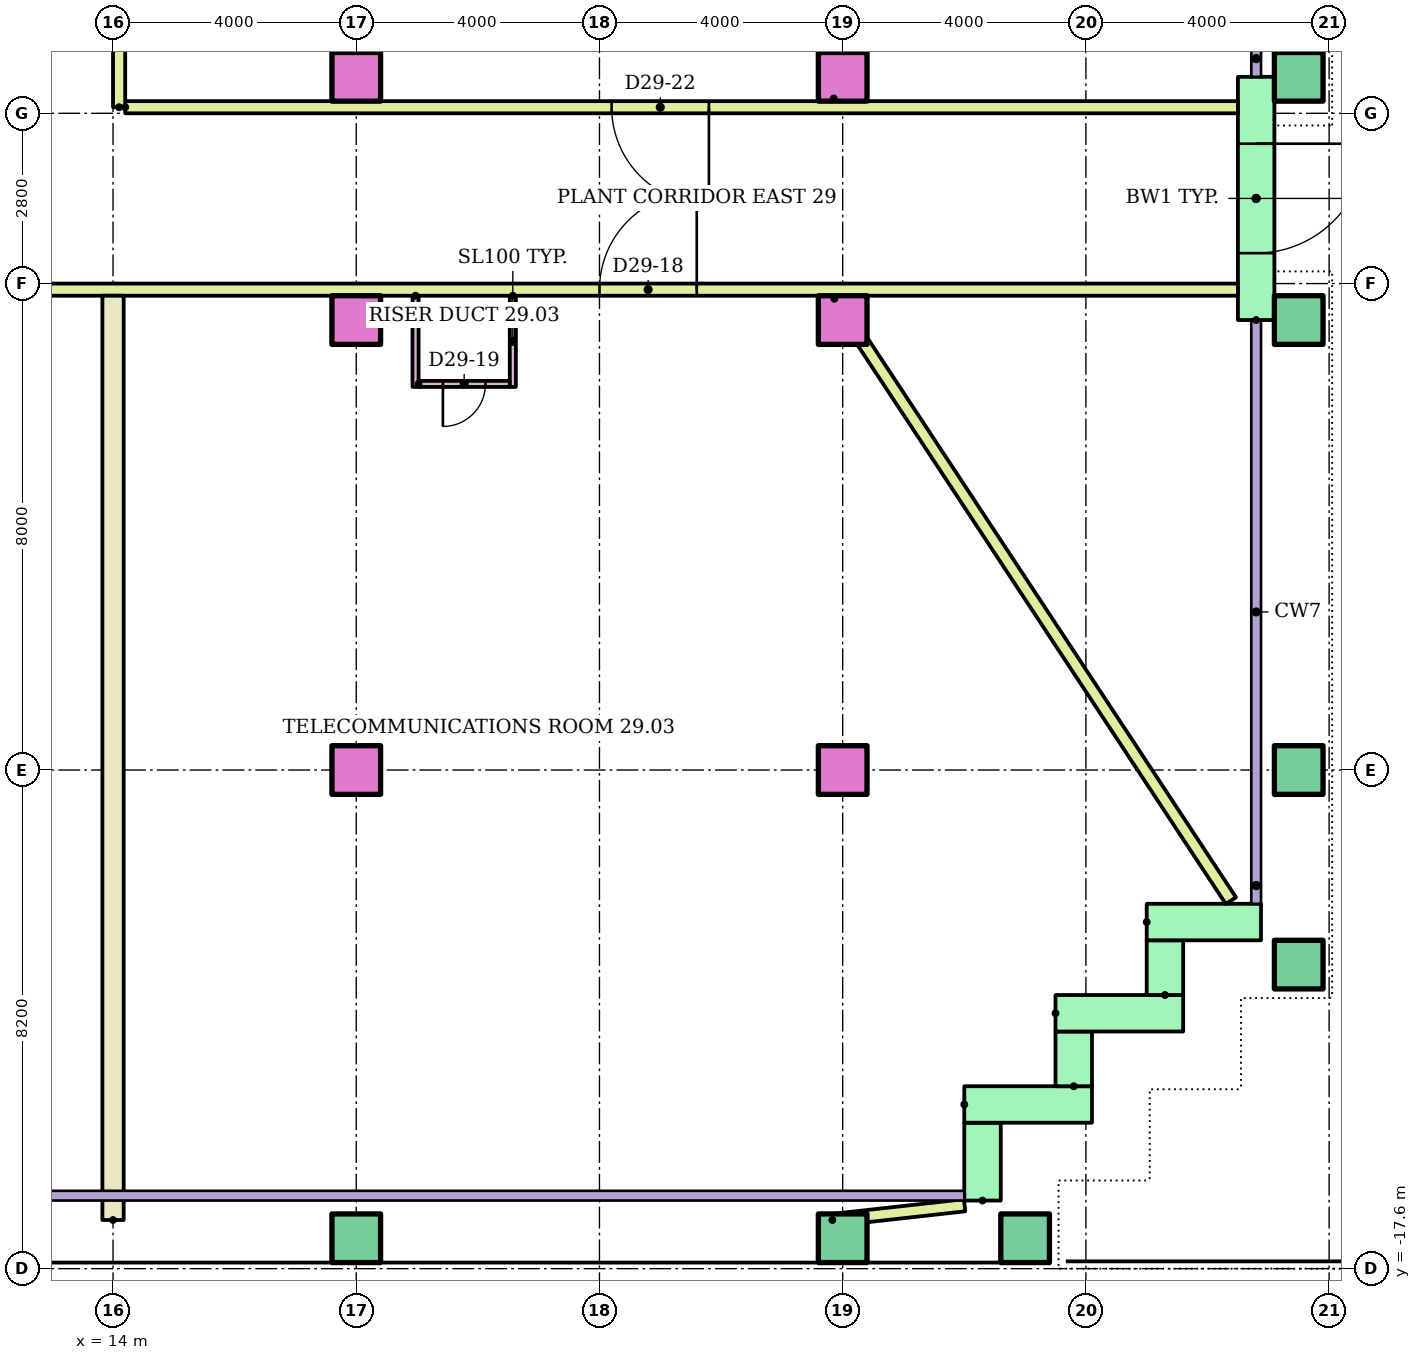
"""IFC4 building model, lengths in metres.
Left out: names, types, materials, properties, quantities, classifications, styles, units other than length and angle.
Written with IfcOpenShell. Run it as: python <this file> out.ifc"""

import sys

from ifc_helpers import new_model, si_unit, direction, frame, frame_2d, origin, origin_2d, place, context, subcontext, project, spatial, rectangle, hollow_rectangle, extrude, element, fill, save


model = new_model("IFC4")
c1 = context("Model", 3, precision=1e-05, world=origin(), true_north=direction((0.0, 1.0)))
c2 = subcontext(c1, "Body", "Model", "MODEL_VIEW")
j1 = project(units=[si_unit("LENGTHUNIT", "METRE"), si_unit("PLANEANGLEUNIT", "RADIAN")], contexts=[c1])
p1 = place(None, origin())
s1 = spatial("IfcSite", under=j1, at=p1, CompositionType="ELEMENT")
p2 = place(p1, origin())
s2 = spatial("IfcBuilding", under=s1, at=p2, CompositionType="ELEMENT")
p3 = place(p2, frame((0.0, 0.0, 115.9)))
s3 = spatial("IfcBuildingStorey", under=s2, at=p3, CompositionType="ELEMENT", Elevation=115.9)
for number, where in (
    (1, (18.0, -17.1, 0.0)),
    (2, (26.0, -17.1, 0.0)),
    (3, (29.0, -17.1, 0.0)),
    (4, (33.5, -12.6, 0.0)),
):
    element("IfcColumn", number, at=place(p3, frame(where)), inside=s3, PredefinedType="COLUMN", context=c2, shape_type="SweptSolid", body=[
        extrude(hollow_rectangle(XDim=0.8, YDim=0.8, WallThickness=0.04, at=origin_2d()), origin(), (0.0, 0.0, 1.0), 3.9),
    ])
for number, where in (
    (5, (18.0, -9.4, 0.0)),
    (6, (26.0, -9.4, 0.0)),
):
    element("IfcColumn", number, at=place(p3, frame(where)), inside=s3, PredefinedType="COLUMN", context=c2, shape_type="SweptSolid", body=[
        extrude(rectangle(XDim=0.8, YDim=0.8, at=origin_2d()), origin(), (0.0, 0.0, 1.0), 3.9),
    ])
p4 = place(p3, frame((33.5, -9.4, 0.0)))
e7 = element("IfcColumn", 7, at=p4, inside=s3, PredefinedType="COLUMN", context=c2, shape_type="SweptSolid", body=[
    extrude(hollow_rectangle(XDim=0.8, YDim=0.8, WallThickness=0.04, at=origin_2d()), origin(), (0.0, 0.0, 1.0), 3.9),
])
for number, where in (
    (8, (18.0, -2.0, 0.0)),
    (9, (26.0, -2.0, 0.0)),
):
    element("IfcColumn", number, at=place(p3, frame(where)), inside=s3, PredefinedType="COLUMN", context=c2, shape_type="SweptSolid", body=[
        extrude(rectangle(XDim=0.8, YDim=0.8, at=origin_2d()), origin(), (0.0, 0.0, 1.0), 3.9),
    ])
p5 = place(p3, frame((33.5, -2.0, 0.0)))
e10 = element("IfcColumn", 10, at=p5, inside=s3, PredefinedType="COLUMN", context=c2, shape_type="SweptSolid", body=[
    extrude(hollow_rectangle(XDim=0.8, YDim=0.8, WallThickness=0.04, at=origin_2d()), origin(), (0.0, 0.0, 1.0), 3.9),
])
for number, where in (
    (11, (18.0, 2.0, 0.0)),
    (12, (26.0, 2.0, 0.0)),
):
    element("IfcColumn", number, at=place(p3, frame(where)), inside=s3, PredefinedType="COLUMN", context=c2, shape_type="SweptSolid", body=[
        extrude(rectangle(XDim=0.8, YDim=0.8, at=origin_2d()), origin(), (0.0, 0.0, 1.0), 3.9),
    ])
p6 = place(p3, frame((33.5, 2.0, 0.0)))
e13 = element("IfcColumn", 13, at=p6, inside=s3, PredefinedType="COLUMN", context=c2, shape_type="SweptSolid", body=[
    extrude(hollow_rectangle(XDim=0.8, YDim=0.8, WallThickness=0.04, at=origin_2d()), origin(), (0.0, 0.0, 1.0), 3.9),
])
p7 = place(p3, frame((28.3, -16.48, 0.0), z_axis=(0.0, 0.0, 1.0), x_axis=(0.0, 1.0, 0.0)))
e14 = element("IfcWall", 14, at=p7, inside=s3, PredefinedType="STANDARD", context=c2, shape_type="SweptSolid", body=[
    extrude(rectangle(XDim=1.28, YDim=0.6, at=frame_2d((0.64, 0.0))), origin(), (0.0, 0.0, 1.0), 3.62),
])
p8 = place(p3, frame((28.0, -14.9, 0.0)))
e15 = element("IfcWall", 15, at=p8, inside=s3, PredefinedType="STANDARD", context=c2, shape_type="SweptSolid", body=[
    extrude(rectangle(XDim=2.1, YDim=0.6, at=frame_2d((1.05, 0.0))), origin(), (0.0, 0.0, 1.0), 3.62),
])
p9 = place(p3, frame((29.8, -14.6, 0.0), z_axis=(0.0, 0.0, 1.0), x_axis=(0.0, 1.0, 0.0)))
e16 = element("IfcWall", 16, at=p9, inside=s3, PredefinedType="STANDARD", context=c2, shape_type="SweptSolid", body=[
    extrude(rectangle(XDim=0.9, YDim=0.6, at=frame_2d((0.45, 0.0))), origin(), (0.0, 0.0, 1.0), 3.62),
])
p10 = place(p3, frame((29.5, -13.4, 0.0)))
e17 = element("IfcWall", 17, at=p10, inside=s3, PredefinedType="STANDARD", context=c2, shape_type="SweptSolid", body=[
    extrude(rectangle(XDim=2.1, YDim=0.6, at=frame_2d((1.05, 0.0))), origin(), (0.0, 0.0, 1.0), 3.62),
])
p11 = place(p3, frame((31.3, -13.1, 0.0), z_axis=(0.0, 0.0, 1.0), x_axis=(0.0, 1.0, 0.0)))
e18 = element("IfcWall", 18, at=p11, inside=s3, PredefinedType="STANDARD", context=c2, shape_type="SweptSolid", body=[
    extrude(rectangle(XDim=0.9, YDim=0.6, at=frame_2d((0.45, 0.0))), origin(), (0.0, 0.0, 1.0), 3.62),
])
p12 = place(p3, frame((31.0, -11.9, 0.0)))
e19 = element("IfcWall", 19, at=p12, inside=s3, PredefinedType="STANDARD", context=c2, shape_type="SweptSolid", body=[
    extrude(rectangle(XDim=1.88, YDim=0.6, at=frame_2d((0.94, 0.0))), origin(), (0.0, 0.0, 1.0), 3.62),
])
p13 = place(p3, frame((32.8, -2.0, 0.0), z_axis=(0.0, 0.0, 1.0), x_axis=(0.0, 1.0, 0.0)))
e20 = element("IfcWall", 20, at=p13, inside=s3, PredefinedType="STANDARD", context=c2, shape_type="SweptSolid", body=[
    extrude(rectangle(XDim=4.0, YDim=0.6, at=frame_2d((2.0, 0.0))), origin(), (0.0, 0.0, 1.0), 3.62),
])
p14 = place(p13, frame((1.1, 0.0, 0.0)))
e21 = element("IfcOpeningElement", 21, at=p14, cuts=e20, PredefinedType="OPENING", context=c2, shape_type="SweptSolid", body=[
    extrude(rectangle(XDim=1.8, YDim=2.1, at=frame_2d((0.9, 1.05))), frame((0.0, 0.31, 0.0), z_axis=(0.0, -1.0, 0.0), x_axis=(1.0, 0.0, 0.0)), (0.0, 0.0, 1.0), 0.62),
])
p15 = place(p3, frame((-33.2, -1.5, 0.0)))
e22 = element("IfcWall", 22, at=p15, inside=s3, PredefinedType="PARTITIONING", context=c2, shape_type="SweptSolid", body=[
    extrude(rectangle(XDim=65.7, YDim=0.2, at=frame_2d((32.85, 0.0))), origin(), (0.0, 0.0, 1.0), 3.62),
])
p16 = place(p15, frame((24.8, 0.0, 0.0)))
e23 = element("IfcOpeningElement", 23, at=p16, cuts=e22, PredefinedType="OPENING", context=c2, shape_type="SweptSolid", body=[
    extrude(rectangle(XDim=1.5, YDim=2.1, at=frame_2d((0.75, 1.05))), frame((0.0, 0.11, 0.0), z_axis=(0.0, -1.0, 0.0), x_axis=(1.0, 0.0, 0.0)), (0.0, 0.0, 1.0), 0.22),
])
p17 = place(p15, frame((39.4, 0.0, 0.0)))
e24 = element("IfcOpeningElement", 24, at=p17, cuts=e22, PredefinedType="OPENING", context=c2, shape_type="SweptSolid", body=[
    extrude(rectangle(XDim=1.5, YDim=2.1, at=frame_2d((0.75, 1.05))), frame((0.0, 0.11, 0.0), z_axis=(0.0, -1.0, 0.0), x_axis=(1.0, 0.0, 0.0)), (0.0, 0.0, 1.0), 0.22),
])
p18 = place(p15, frame((55.2, 0.0, 0.0)))
e25 = element("IfcOpeningElement", 25, at=p18, cuts=e22, PredefinedType="OPENING", context=c2, shape_type="SweptSolid", body=[
    extrude(rectangle(XDim=1.6, YDim=2.4, at=frame_2d((0.8, 1.2))), frame((0.0, 0.11, 0.0), z_axis=(0.0, -1.0, 0.0), x_axis=(1.0, 0.0, 0.0)), (0.0, 0.0, 1.0), 0.22),
])
p19 = place(p15, frame((12.0, 0.0, 0.0)))
e26 = element("IfcOpeningElement", 26, at=p19, cuts=e22, PredefinedType="OPENING", context=c2, shape_type="SweptSolid", body=[
    extrude(rectangle(XDim=1.0, YDim=2.4, at=frame_2d((0.5, 1.2))), frame((0.0, 0.11, 0.0), z_axis=(0.0, -1.0, 0.0), x_axis=(1.0, 0.0, 0.0)), (0.0, 0.0, 1.0), 0.22),
])
p20 = place(p3, frame((14.2, 1.5, 0.0)))
e27 = element("IfcWall", 27, at=p20, inside=s3, PredefinedType="PARTITIONING", context=c2, shape_type="SweptSolid", body=[
    extrude(rectangle(XDim=18.3, YDim=0.2, at=frame_2d((9.15, 0.0))), origin(), (0.0, 0.0, 1.0), 3.62),
])
p21 = place(p20, frame((8.0, 0.0, 0.0)))
e28 = element("IfcOpeningElement", 28, at=p21, cuts=e27, PredefinedType="OPENING", context=c2, shape_type="SweptSolid", body=[
    extrude(rectangle(XDim=1.6, YDim=2.4, at=frame_2d((0.8, 1.2))), frame((0.0, 0.11, 0.0), z_axis=(0.0, -1.0, 0.0), x_axis=(1.0, 0.0, 0.0)), (0.0, 0.0, 1.0), 0.22),
])
p22 = place(p3, frame((14.1, 1.5, 0.0), z_axis=(0.0, 0.0, 1.0), x_axis=(0.0, 1.0, 0.0)))
e29 = element("IfcWall", 29, at=p22, inside=s3, PredefinedType="PARTITIONING", context=c2, shape_type="SweptSolid", body=[
    extrude(rectangle(XDim=1.5, YDim=0.2, at=frame_2d((0.75, 0.0))), origin(), (0.0, 0.0, 1.0), 3.62),
])
for number, where, z_axis, x_axis in (
    (30, (18.975, -1.6, 0.0), (0.0, 0.0, 1.0), (0.0, -1.0, 0.0)),
    (31, (20.575, -1.6, 0.0), (0.0, 0.0, 1.0), (0.0, -1.0, 0.0)),
):
    element("IfcWall", number, at=place(p3, frame(where, z_axis=z_axis, x_axis=x_axis)), inside=s3, PredefinedType="PARTITIONING", context=c2, shape_type="SweptSolid", body=[
        extrude(rectangle(XDim=1.5, YDim=0.1, at=frame_2d((0.75, 0.0))), origin(), (0.0, 0.0, 1.0), 3.62),
    ])
p23 = place(p3, frame((19.025, -3.05, 0.0)))
e32 = element("IfcWall", 32, at=p23, inside=s3, PredefinedType="PARTITIONING", context=c2, shape_type="SweptSolid", body=[
    extrude(rectangle(XDim=1.5, YDim=0.1, at=frame_2d((0.75, 0.0))), origin(), (0.0, 0.0, 1.0), 3.62),
])
p24 = place(p23, frame((0.4, 0.0, 0.0)))
e33 = element("IfcOpeningElement", 33, at=p24, cuts=e32, PredefinedType="OPENING", context=c2, shape_type="SweptSolid", body=[
    extrude(rectangle(XDim=0.7, YDim=2.0, at=frame_2d((0.35, 1.0))), frame((0.0, 0.06, 0.0), z_axis=(0.0, -1.0, 0.0), x_axis=(1.0, 0.0, 0.0)), (0.0, 0.0, 1.0), 0.12),
])
p25 = place(p3, frame((25.83, -16.8, 0.0), z_axis=(0.0, 0.0, 1.0), x_axis=(0.993841474797, 0.110811204185, 0.0)))
e34 = element("IfcWall", 34, at=p25, inside=s3, PredefinedType="PARTITIONING", context=c2, shape_type="SweptSolid", body=[
    extrude(rectangle(XDim=2.188, YDim=0.2, at=frame_2d((1.094, 0.0))), origin(), (0.0, 0.0, 1.0), 3.62),
])
p26 = place(p3, frame((25.863, -1.65, 0.0), z_axis=(0.0, 0.0, 1.0), x_axis=(0.550181517004, -0.835045087613, 0.0)))
e35 = element("IfcWall", 35, at=p26, inside=s3, PredefinedType="PARTITIONING", context=c2, shape_type="SweptSolid", body=[
    extrude(rectangle(XDim=11.854, YDim=0.2, at=frame_2d((5.927, 0.0))), origin(), (0.0, 0.0, 1.0), 3.62),
])
p27 = place(p3, frame((14.0, -16.8, 0.0), z_axis=(0.0, 0.0, 1.0), x_axis=(0.0, 1.0, 0.0)))
e36 = element("IfcWall", 36, at=p27, inside=s3, PredefinedType="PARTITIONING", context=c2, shape_type="SweptSolid", body=[
    extrude(rectangle(XDim=15.2, YDim=0.35, at=frame_2d((7.6, 0.0))), origin(), (0.0, 0.0, 1.0), 3.62),
])
p28 = place(p3, frame((25.854, 1.644, 0.0), z_axis=(0.0, 0.0, 1.0), x_axis=(0.473899953107, 0.880578692932, 0.0)))
e37 = element("IfcWall", 37, at=p28, inside=s3, PredefinedType="PARTITIONING", context=c2, shape_type="SweptSolid", body=[
    extrude(rectangle(XDim=13.986, YDim=0.2, at=frame_2d((6.993, 0.0))), origin(), (0.0, 0.0, 1.0), 3.62),
])
p29 = place(p14, frame((1.8, 0.0, 0.0), z_axis=(0.0, 0.0, 1.0), x_axis=(-1.0, 0.0, 0.0)))
e38 = element("IfcDoor", 38, at=p29, inside=s3, OperationType="DOUBLE_DOOR_SINGLE_SWING", PredefinedType="DOOR", context=c2, shape_type="SweptSolid", body=[
    extrude(rectangle(XDim=1.8, YDim=2.1, at=frame_2d((0.9, 1.05))), frame((0.0, 0.025, 0.0), z_axis=(0.0, -1.0, 0.0), x_axis=(1.0, 0.0, 0.0)), (0.0, 0.0, 1.0), 0.05),
])
fill(e21, e38)
p30 = place(p18, origin())
e39 = element("IfcDoor", 39, at=p30, inside=s3, OperationType="DOUBLE_DOOR_SINGLE_SWING", PredefinedType="DOOR", context=c2, shape_type="SweptSolid", body=[
    extrude(rectangle(XDim=1.6, YDim=2.4, at=frame_2d((0.8, 1.2))), frame((0.0, 0.025, 0.0), z_axis=(0.0, -1.0, 0.0), x_axis=(1.0, 0.0, 0.0)), (0.0, 0.0, 1.0), 0.05),
])
fill(e25, e39)
p31 = place(p24, frame((0.7, 0.0, 0.0), z_axis=(0.0, 0.0, 1.0), x_axis=(-1.0, 0.0, 0.0)))
e40 = element("IfcDoor", 40, at=p31, inside=s3, OperationType="SINGLE_SWING_LEFT", PredefinedType="DOOR", context=c2, shape_type="SweptSolid", body=[
    extrude(rectangle(XDim=0.7, YDim=2.0, at=frame_2d((0.35, 1.0))), frame((0.0, 0.025, 0.0), z_axis=(0.0, -1.0, 0.0), x_axis=(1.0, 0.0, 0.0)), (0.0, 0.0, 1.0), 0.05),
])
fill(e33, e40)
p32 = place(p21, frame((1.6, 0.0, 0.0), z_axis=(0.0, 0.0, 1.0), x_axis=(-1.0, 0.0, 0.0)))
e41 = element("IfcDoor", 41, at=p32, inside=s3, OperationType="DOUBLE_DOOR_SINGLE_SWING", PredefinedType="DOOR", context=c2, shape_type="SweptSolid", body=[
    extrude(rectangle(XDim=1.6, YDim=2.4, at=frame_2d((0.8, 1.2))), frame((0.0, 0.025, 0.0), z_axis=(0.0, -1.0, 0.0), x_axis=(1.0, 0.0, 0.0)), (0.0, 0.0, 1.0), 0.05),
])
fill(e28, e41)
save(model, sys.argv[1])
